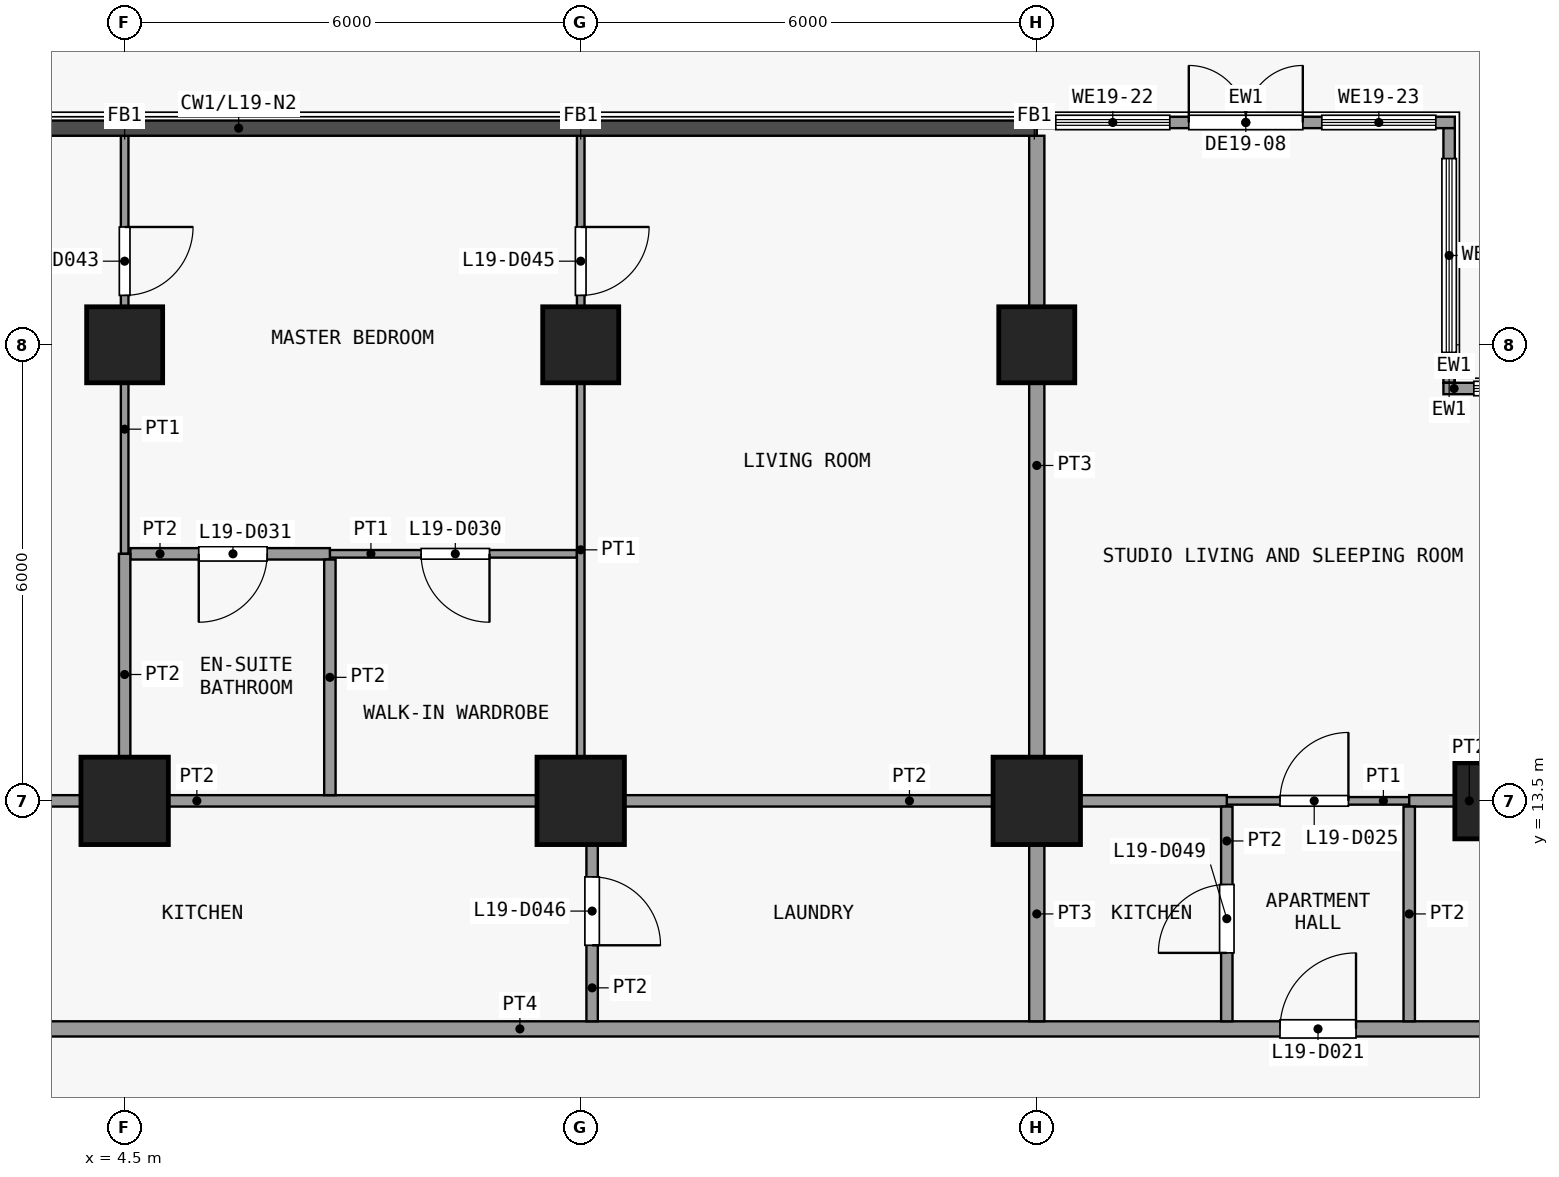
"""IFC4 building model, lengths in metres.
Left out: names, types, materials, properties, quantities, classifications, styles, units other than length and angle.
Written with IfcOpenShell. Run it as: python <this file> out.ifc"""

import sys

from ifc_helpers import new_model, si_unit, direction, frame, frame_2d, origin, origin_2d, place, context, subcontext, project, spatial, rectangle, extrude, element, fill, save


model = new_model("IFC4")
c1 = context("Model", 3, precision=1e-05, world=origin(), true_north=direction((0.0, 1.0)))
c2 = subcontext(c1, "Body", "Model", "MODEL_VIEW")
j1 = project(units=[si_unit("LENGTHUNIT", "METRE"), si_unit("PLANEANGLEUNIT", "RADIAN")], contexts=[c1])
p1 = place(None, origin())
s1 = spatial("IfcSite", under=j1, at=p1, CompositionType="ELEMENT")
p2 = place(p1, origin())
s2 = spatial("IfcBuilding", under=s1, at=p2, CompositionType="ELEMENT")
p3 = place(p2, frame((0.0, 0.0, 81.1)))
s3 = spatial("IfcBuildingStorey", under=s2, at=p3, CompositionType="ELEMENT", Elevation=81.1)
p4 = place(p3, frame((4.5, 13.5, 0.0), z_axis=(0.0, 0.0, 1.0), x_axis=(1.0, 0.0, 0.0)))
e1 = element("IfcColumn", 1, at=p4, inside=s3, PredefinedType="COLUMN", context=c2, shape_type="SweptSolid", body=[
    extrude(rectangle(XDim=1.15, YDim=1.15, at=origin_2d()), origin(), (0.0, 0.0, 1.0), 3.6),
])
p5 = place(p3, frame((4.5, 19.5, 0.0), z_axis=(0.0, 0.0, 1.0), x_axis=(1.0, 0.0, 0.0)))
e2 = element("IfcColumn", 2, at=p5, inside=s3, PredefinedType="COLUMN", context=c2, shape_type="SweptSolid", body=[
    extrude(rectangle(XDim=1.0, YDim=1.0, at=origin_2d()), origin(), (0.0, 0.0, 1.0), 3.6),
])
p6 = place(p3, frame((10.5, 13.5, 0.0), z_axis=(0.0, 0.0, 1.0), x_axis=(1.0, 0.0, 0.0)))
e3 = element("IfcColumn", 3, at=p6, inside=s3, PredefinedType="COLUMN", context=c2, shape_type="SweptSolid", body=[
    extrude(rectangle(XDim=1.15, YDim=1.15, at=origin_2d()), origin(), (0.0, 0.0, 1.0), 3.6),
])
p7 = place(p3, frame((10.5, 19.5, 0.0), z_axis=(0.0, 0.0, 1.0), x_axis=(1.0, 0.0, 0.0)))
e4 = element("IfcColumn", 4, at=p7, inside=s3, PredefinedType="COLUMN", context=c2, shape_type="SweptSolid", body=[
    extrude(rectangle(XDim=1.0, YDim=1.0, at=origin_2d()), origin(), (0.0, 0.0, 1.0), 3.6),
])
p8 = place(p3, frame((16.5, 13.5, 0.0), z_axis=(0.0, 0.0, 1.0), x_axis=(1.0, 0.0, 0.0)))
e5 = element("IfcColumn", 5, at=p8, inside=s3, PredefinedType="COLUMN", context=c2, shape_type="SweptSolid", body=[
    extrude(rectangle(XDim=1.15, YDim=1.15, at=origin_2d()), origin(), (0.0, 0.0, 1.0), 3.6),
])
for number, where, z_axis, x_axis in (
    (6, (16.5, 19.5, 0.0), (0.0, 0.0, 1.0), (1.0, 0.0, 0.0)),
    (7, (22.5, 13.5, 0.0), (0.0, 0.0, 1.0), (1.0, 0.0, 0.0)),
):
    element("IfcColumn", number, at=place(p3, frame(where, z_axis=z_axis, x_axis=x_axis)), inside=s3, PredefinedType="COLUMN", context=c2, shape_type="SweptSolid", body=[
        extrude(rectangle(XDim=1.0, YDim=1.0, at=origin_2d()), origin(), (0.0, 0.0, 1.0), 3.6),
    ])
p9 = place(p3, frame((21.925, 22.35, 0.0), z_axis=(0.0, 0.0, 1.0), x_axis=(0.0, -1.0, 0.0)))
e8 = element("IfcWall", 8, at=p9, inside=s3, PredefinedType="SOLIDWALL", context=c2, shape_type="SweptSolid", body=[
    extrude(rectangle(XDim=3.35, YDim=0.15, at=frame_2d((1.675, 0.0))), origin(), (0.0, 0.0, 1.0), 3.3),
])
p10 = place(p9, frame((0.4, 0.0, 0.9)))
e9 = element("IfcOpeningElement", 9, at=p10, cuts=e8, PredefinedType="OPENING", context=c2, shape_type="SweptSolid", body=[
    extrude(rectangle(XDim=2.55, YDim=2.4, at=frame_2d((1.275, 1.2))), frame((0.0, 0.085, 0.0), z_axis=(0.0, -1.0, 0.0), x_axis=(1.0, 0.0, 0.0)), (0.0, 0.0, 1.0), 0.17),
])
p11 = place(p3, frame((21.85, 18.925, 0.0), z_axis=(0.0, 0.0, 1.0), x_axis=(1.0, 0.0, 0.0)))
e10 = element("IfcWall", 10, at=p11, inside=s3, PredefinedType="SOLIDWALL", context=c2, shape_type="SweptSolid", body=[
    extrude(rectangle(XDim=3.65, YDim=0.15, at=frame_2d((1.825, 0.0))), origin(), (0.0, 0.0, 1.0), 3.3),
])
p12 = place(p11, frame((0.4, 0.0, 0.9)))
e11 = element("IfcOpeningElement", 11, at=p12, cuts=e10, PredefinedType="OPENING", context=c2, shape_type="SweptSolid", body=[
    extrude(rectangle(XDim=2.85, YDim=2.4, at=frame_2d((1.425, 1.2))), frame((0.0, 0.085, 0.0), z_axis=(0.0, -1.0, 0.0), x_axis=(1.0, 0.0, 0.0)), (0.0, 0.0, 1.0), 0.17),
])
p13 = place(p3, frame((16.5, 22.425, 0.0), z_axis=(0.0, 0.0, 1.0), x_axis=(1.0, 0.0, 0.0)))
e12 = element("IfcWall", 12, at=p13, inside=s3, PredefinedType="SOLIDWALL", context=c2, shape_type="SweptSolid", body=[
    extrude(rectangle(XDim=5.5, YDim=0.15, at=frame_2d((2.75, 0.0))), origin(), (0.0, 0.0, 1.0), 3.3),
])
p14 = place(p13, frame((2.0, 0.0, 0.0)))
e13 = element("IfcOpeningElement", 13, at=p14, cuts=e12, PredefinedType="OPENING", context=c2, shape_type="SweptSolid", body=[
    extrude(rectangle(XDim=1.5, YDim=2.4, at=frame_2d((0.75, 1.2))), frame((0.0, 0.085, 0.0), z_axis=(0.0, -1.0, 0.0), x_axis=(1.0, 0.0, 0.0)), (0.0, 0.0, 1.0), 0.17),
])
p15 = place(p13, frame((0.25, 0.0, 0.9)))
e14 = element("IfcOpeningElement", 14, at=p15, cuts=e12, PredefinedType="OPENING", context=c2, shape_type="SweptSolid", body=[
    extrude(rectangle(XDim=1.5, YDim=2.1, at=frame_2d((0.75, 1.05))), frame((0.0, 0.085, 0.0), z_axis=(0.0, -1.0, 0.0), x_axis=(1.0, 0.0, 0.0)), (0.0, 0.0, 1.0), 0.17),
])
p16 = place(p13, frame((3.75, 0.0, 0.9)))
e15 = element("IfcOpeningElement", 15, at=p16, cuts=e12, PredefinedType="OPENING", context=c2, shape_type="SweptSolid", body=[
    extrude(rectangle(XDim=1.5, YDim=2.1, at=frame_2d((0.75, 1.05))), frame((0.0, 0.085, 0.0), z_axis=(0.0, -1.0, 0.0), x_axis=(1.0, 0.0, 0.0)), (0.0, 0.0, 1.0), 0.17),
])
p17 = place(p3, frame((-23.85, 10.5, 0.0), z_axis=(0.0, 0.0, 1.0), x_axis=(1.0, 0.0, 0.0)))
e16 = element("IfcWall", 16, at=p17, inside=s3, PredefinedType="PARTITIONING", context=c2, shape_type="SweptSolid", body=[
    extrude(rectangle(XDim=49.2, YDim=0.2, at=frame_2d((24.6, 0.0))), origin(), (0.0, 0.0, 1.0), 3.3),
])
p18 = place(p17, frame((5.55, 0.0, 0.0)))
e17 = element("IfcOpeningElement", 17, at=p18, cuts=e16, PredefinedType="OPENING", context=c2, shape_type="SweptSolid", body=[
    extrude(rectangle(XDim=1.0, YDim=2.1, at=frame_2d((0.5, 1.05))), frame((0.0, 0.11, 0.0), z_axis=(0.0, -1.0, 0.0), x_axis=(1.0, 0.0, 0.0)), (0.0, 0.0, 1.0), 0.22),
])
p19 = place(p17, frame((14.05, 0.0, 0.0)))
e18 = element("IfcOpeningElement", 18, at=p19, cuts=e16, PredefinedType="OPENING", context=c2, shape_type="SweptSolid", body=[
    extrude(rectangle(XDim=1.0, YDim=2.1, at=frame_2d((0.5, 1.05))), frame((0.0, 0.11, 0.0), z_axis=(0.0, -1.0, 0.0), x_axis=(1.0, 0.0, 0.0)), (0.0, 0.0, 1.0), 0.22),
])
p20 = place(p17, frame((22.55, 0.0, 0.0)))
e19 = element("IfcOpeningElement", 19, at=p20, cuts=e16, PredefinedType="OPENING", context=c2, shape_type="SweptSolid", body=[
    extrude(rectangle(XDim=1.0, YDim=2.1, at=frame_2d((0.5, 1.05))), frame((0.0, 0.11, 0.0), z_axis=(0.0, -1.0, 0.0), x_axis=(1.0, 0.0, 0.0)), (0.0, 0.0, 1.0), 0.22),
])
p21 = place(p17, frame((43.55, 0.0, 0.0)))
e20 = element("IfcOpeningElement", 20, at=p21, cuts=e16, PredefinedType="OPENING", context=c2, shape_type="SweptSolid", body=[
    extrude(rectangle(XDim=1.0, YDim=2.1, at=frame_2d((0.5, 1.05))), frame((0.0, 0.11, 0.0), z_axis=(0.0, -1.0, 0.0), x_axis=(1.0, 0.0, 0.0)), (0.0, 0.0, 1.0), 0.22),
])
p22 = place(p3, frame((19.0, 13.5, 0.0), z_axis=(0.0, 0.0, 1.0), x_axis=(1.0, 0.0, 0.0)))
e21 = element("IfcWall", 21, at=p22, inside=s3, PredefinedType="PARTITIONING", context=c2, shape_type="SweptSolid", body=[
    extrude(rectangle(XDim=2.4, YDim=0.1, at=frame_2d((1.2, 0.0))), origin(), (0.0, 0.0, 1.0), 3.3),
])
p23 = place(p22, frame((0.7, 0.0, 0.0)))
e22 = element("IfcOpeningElement", 22, at=p23, cuts=e21, PredefinedType="OPENING", context=c2, shape_type="SweptSolid", body=[
    extrude(rectangle(XDim=0.9, YDim=2.1, at=frame_2d((0.45, 1.05))), frame((0.0, 0.06, 0.0), z_axis=(0.0, -1.0, 0.0), x_axis=(1.0, 0.0, 0.0)), (0.0, 0.0, 1.0), 0.12),
])
p24 = place(p3, frame((0.4, 13.5, 0.0), z_axis=(0.0, 0.0, 1.0), x_axis=(1.0, 0.0, 0.0)))
e23 = element("IfcWall", 23, at=p24, inside=s3, PredefinedType="PARTITIONING", context=c2, shape_type="SweptSolid", body=[
    extrude(rectangle(XDim=10.1, YDim=0.15, at=frame_2d((5.05, 0.0))), origin(), (0.0, 0.0, 1.0), 3.3),
])
p25 = place(p3, frame((10.65, 13.5, 0.0), z_axis=(0.0, 0.0, 1.0), x_axis=(1.0, 0.0, 0.0)))
e24 = element("IfcWall", 24, at=p25, inside=s3, PredefinedType="PARTITIONING", context=c2, shape_type="SweptSolid", body=[
    extrude(rectangle(XDim=8.35, YDim=0.15, at=frame_2d((4.175, 0.0))), origin(), (0.0, 0.0, 1.0), 3.3),
])
p26 = place(p3, frame((21.4, 13.5, 0.0), z_axis=(0.0, 0.0, 1.0), x_axis=(1.0, 0.0, 0.0)))
e25 = element("IfcWall", 25, at=p26, inside=s3, PredefinedType="PARTITIONING", context=c2, shape_type="SweptSolid", body=[
    extrude(rectangle(XDim=3.85, YDim=0.15, at=frame_2d((1.925, 0.0))), origin(), (0.0, 0.0, 1.0), 3.3),
])
p27 = place(p26, frame((1.7, 0.0, 0.0)))
e26 = element("IfcOpeningElement", 26, at=p27, cuts=e25, PredefinedType="OPENING", context=c2, shape_type="SweptSolid", body=[
    extrude(rectangle(XDim=0.9, YDim=2.1, at=frame_2d((0.45, 1.05))), frame((0.0, 0.085, 0.0), z_axis=(0.0, -1.0, 0.0), x_axis=(1.0, 0.0, 0.0)), (0.0, 0.0, 1.0), 0.17),
])
p28 = place(p3, frame((7.2, 16.75, 0.0), z_axis=(0.0, 0.0, 1.0), x_axis=(1.0, 0.0, 0.0)))
e27 = element("IfcWall", 27, at=p28, inside=s3, PredefinedType="PARTITIONING", context=c2, shape_type="SweptSolid", body=[
    extrude(rectangle(XDim=3.25, YDim=0.1, at=frame_2d((1.625, 0.0))), origin(), (0.0, 0.0, 1.0), 3.3),
])
p29 = place(p28, frame((1.2, 0.0, 0.0)))
e28 = element("IfcOpeningElement", 28, at=p29, cuts=e27, PredefinedType="OPENING", context=c2, shape_type="SweptSolid", body=[
    extrude(rectangle(XDim=0.9, YDim=2.1, at=frame_2d((0.45, 1.05))), frame((0.0, 0.06, 0.0), z_axis=(0.0, -1.0, 0.0), x_axis=(1.0, 0.0, 0.0)), (0.0, 0.0, 1.0), 0.12),
])
p30 = place(p3, frame((4.575, 16.75, 0.0), z_axis=(0.0, 0.0, 1.0), x_axis=(1.0, 0.0, 0.0)))
e29 = element("IfcWall", 29, at=p30, inside=s3, PredefinedType="PARTITIONING", context=c2, shape_type="SweptSolid", body=[
    extrude(rectangle(XDim=2.625, YDim=0.15, at=frame_2d((1.312, 0.0))), origin(), (0.0, 0.0, 1.0), 3.3),
])
p31 = place(p30, frame((0.9, 0.0, 0.0)))
e30 = element("IfcOpeningElement", 30, at=p31, cuts=e29, PredefinedType="OPENING", context=c2, shape_type="SweptSolid", body=[
    extrude(rectangle(XDim=0.9, YDim=2.1, at=frame_2d((0.45, 1.05))), frame((0.0, 0.085, 0.0), z_axis=(0.0, -1.0, 0.0), x_axis=(1.0, 0.0, 0.0)), (0.0, 0.0, 1.0), 0.17),
])
p32 = place(p3, frame((4.5, 16.75, 0.0), z_axis=(0.0, 0.0, 1.0), x_axis=(0.0, 1.0, 0.0)))
e31 = element("IfcWall", 31, at=p32, inside=s3, PredefinedType="PARTITIONING", context=c2, shape_type="SweptSolid", body=[
    extrude(rectangle(XDim=5.5, YDim=0.1, at=frame_2d((2.75, 0.0))), origin(), (0.0, 0.0, 1.0), 3.3),
])
p33 = place(p32, frame((3.4, 0.0, 0.0)))
e32 = element("IfcOpeningElement", 32, at=p33, cuts=e31, PredefinedType="OPENING", context=c2, shape_type="SweptSolid", body=[
    extrude(rectangle(XDim=0.9, YDim=2.1, at=frame_2d((0.45, 1.05))), frame((0.0, 0.06, 0.0), z_axis=(0.0, -1.0, 0.0), x_axis=(1.0, 0.0, 0.0)), (0.0, 0.0, 1.0), 0.12),
])
p34 = place(p3, frame((4.5, 13.575, 0.0), z_axis=(0.0, 0.0, 1.0), x_axis=(0.0, 1.0, 0.0)))
e33 = element("IfcWall", 33, at=p34, inside=s3, PredefinedType="PARTITIONING", context=c2, shape_type="SweptSolid", body=[
    extrude(rectangle(XDim=3.175, YDim=0.15, at=frame_2d((1.587, 0.0))), origin(), (0.0, 0.0, 1.0), 3.3),
])
p35 = place(p3, frame((7.2, 13.575, 0.0), z_axis=(0.0, 0.0, 1.0), x_axis=(0.0, 1.0, 0.0)))
e34 = element("IfcWall", 34, at=p35, inside=s3, PredefinedType="PARTITIONING", context=c2, shape_type="SweptSolid", body=[
    extrude(rectangle(XDim=3.1, YDim=0.15, at=frame_2d((1.55, 0.0))), origin(), (0.0, 0.0, 1.0), 3.3),
])
p36 = place(p3, frame((10.5, 13.575, 0.0), z_axis=(0.0, 0.0, 1.0), x_axis=(0.0, 1.0, 0.0)))
e35 = element("IfcWall", 35, at=p36, inside=s3, PredefinedType="PARTITIONING", context=c2, shape_type="SweptSolid", body=[
    extrude(rectangle(XDim=8.675, YDim=0.1, at=frame_2d((4.337, 0.0))), origin(), (0.0, 0.0, 1.0), 3.3),
])
p37 = place(p36, frame((6.575, 0.0, 0.0)))
e36 = element("IfcOpeningElement", 36, at=p37, cuts=e35, PredefinedType="OPENING", context=c2, shape_type="SweptSolid", body=[
    extrude(rectangle(XDim=0.9, YDim=2.1, at=frame_2d((0.45, 1.05))), frame((0.0, 0.06, 0.0), z_axis=(0.0, -1.0, 0.0), x_axis=(1.0, 0.0, 0.0)), (0.0, 0.0, 1.0), 0.12),
])
p38 = place(p3, frame((10.65, 10.6, 0.0), z_axis=(0.0, 0.0, 1.0), x_axis=(0.0, 1.0, 0.0)))
e37 = element("IfcWall", 37, at=p38, inside=s3, PredefinedType="PARTITIONING", context=c2, shape_type="SweptSolid", body=[
    extrude(rectangle(XDim=2.825, YDim=0.15, at=frame_2d((1.413, 0.0))), origin(), (0.0, 0.0, 1.0), 3.3),
])
p39 = place(p38, frame((1.0, 0.0, 0.0)))
e38 = element("IfcOpeningElement", 38, at=p39, cuts=e37, PredefinedType="OPENING", context=c2, shape_type="SweptSolid", body=[
    extrude(rectangle(XDim=0.9, YDim=2.1, at=frame_2d((0.45, 1.05))), frame((0.0, 0.085, 0.0), z_axis=(0.0, -1.0, 0.0), x_axis=(1.0, 0.0, 0.0)), (0.0, 0.0, 1.0), 0.17),
])
p40 = place(p3, frame((16.5, 10.6, 0.0), z_axis=(0.0, 0.0, 1.0), x_axis=(0.0, 1.0, 0.0)))
e39 = element("IfcWall", 39, at=p40, inside=s3, PredefinedType="PARTITIONING", context=c2, shape_type="SweptSolid", body=[
    extrude(rectangle(XDim=2.825, YDim=0.2, at=frame_2d((1.413, 0.0))), origin(), (0.0, 0.0, 1.0), 3.3),
])
p41 = place(p3, frame((16.5, 13.575, 0.0), z_axis=(0.0, 0.0, 1.0), x_axis=(0.0, 1.0, 0.0)))
e40 = element("IfcWall", 40, at=p41, inside=s3, PredefinedType="PARTITIONING", context=c2, shape_type="SweptSolid", body=[
    extrude(rectangle(XDim=8.675, YDim=0.2, at=frame_2d((4.337, 0.0))), origin(), (0.0, 0.0, 1.0), 3.3),
])
p42 = place(p3, frame((19.0, 10.6, 0.0), z_axis=(0.0, 0.0, 1.0), x_axis=(0.0, 1.0, 0.0)))
e41 = element("IfcWall", 41, at=p42, inside=s3, PredefinedType="PARTITIONING", context=c2, shape_type="SweptSolid", body=[
    extrude(rectangle(XDim=2.825, YDim=0.15, at=frame_2d((1.413, 0.0))), origin(), (0.0, 0.0, 1.0), 3.3),
])
p43 = place(p42, frame((0.9, 0.0, 0.0)))
e42 = element("IfcOpeningElement", 42, at=p43, cuts=e41, PredefinedType="OPENING", context=c2, shape_type="SweptSolid", body=[
    extrude(rectangle(XDim=0.9, YDim=2.1, at=frame_2d((0.45, 1.05))), frame((0.0, 0.085, 0.0), z_axis=(0.0, -1.0, 0.0), x_axis=(1.0, 0.0, 0.0)), (0.0, 0.0, 1.0), 0.17),
])
p44 = place(p3, frame((21.4, 10.6, 0.0), z_axis=(0.0, 0.0, 1.0), x_axis=(0.0, 1.0, 0.0)))
e43 = element("IfcWall", 43, at=p44, inside=s3, PredefinedType="PARTITIONING", context=c2, shape_type="SweptSolid", body=[
    extrude(rectangle(XDim=2.825, YDim=0.15, at=frame_2d((1.413, 0.0))), origin(), (0.0, 0.0, 1.0), 3.3),
])
p45 = place(p10, origin())
e44 = element("IfcWindow", 44, at=p45, inside=s3, PartitioningType="SINGLE_PANEL", PredefinedType="WINDOW", context=c2, shape_type="SweptSolid", body=[
    extrude(rectangle(XDim=2.55, YDim=2.4, at=frame_2d((1.275, 1.2))), frame((0.0, 0.03, 0.0), z_axis=(0.0, -1.0, 0.0), x_axis=(1.0, 0.0, 0.0)), (0.0, 0.0, 1.0), 0.06),
])
fill(e9, e44)
p46 = place(p12, origin())
e45 = element("IfcWindow", 45, at=p46, inside=s3, PartitioningType="SINGLE_PANEL", PredefinedType="WINDOW", context=c2, shape_type="SweptSolid", body=[
    extrude(rectangle(XDim=2.85, YDim=2.4, at=frame_2d((1.425, 1.2))), frame((0.0, 0.03, 0.0), z_axis=(0.0, -1.0, 0.0), x_axis=(1.0, 0.0, 0.0)), (0.0, 0.0, 1.0), 0.06),
])
fill(e11, e45)
p47 = place(p14, origin())
e46 = element("IfcDoor", 46, at=p47, inside=s3, OperationType="DOUBLE_DOOR_SINGLE_SWING", PredefinedType="DOOR", context=c2, shape_type="SweptSolid", body=[
    extrude(rectangle(XDim=1.5, YDim=2.4, at=frame_2d((0.75, 1.2))), frame((0.0, 0.025, 0.0), z_axis=(0.0, -1.0, 0.0), x_axis=(1.0, 0.0, 0.0)), (0.0, 0.0, 1.0), 0.05),
])
fill(e13, e46)
p48 = place(p15, origin())
e47 = element("IfcWindow", 47, at=p48, inside=s3, PartitioningType="SINGLE_PANEL", PredefinedType="WINDOW", context=c2, shape_type="SweptSolid", body=[
    extrude(rectangle(XDim=1.5, YDim=2.1, at=frame_2d((0.75, 1.05))), frame((0.0, 0.03, 0.0), z_axis=(0.0, -1.0, 0.0), x_axis=(1.0, 0.0, 0.0)), (0.0, 0.0, 1.0), 0.06),
])
fill(e14, e47)
p49 = place(p16, origin())
e48 = element("IfcWindow", 48, at=p49, inside=s3, PartitioningType="SINGLE_PANEL", PredefinedType="WINDOW", context=c2, shape_type="SweptSolid", body=[
    extrude(rectangle(XDim=1.5, YDim=2.1, at=frame_2d((0.75, 1.05))), frame((0.0, 0.03, 0.0), z_axis=(0.0, -1.0, 0.0), x_axis=(1.0, 0.0, 0.0)), (0.0, 0.0, 1.0), 0.06),
])
fill(e15, e48)
p50 = place(p21, origin())
e49 = element("IfcDoor", 49, at=p50, inside=s3, OperationType="SINGLE_SWING_LEFT", PredefinedType="DOOR", context=c2, shape_type="SweptSolid", body=[
    extrude(rectangle(XDim=1.0, YDim=2.1, at=frame_2d((0.5, 1.05))), frame((0.0, 0.025, 0.0), z_axis=(0.0, -1.0, 0.0), x_axis=(1.0, 0.0, 0.0)), (0.0, 0.0, 1.0), 0.05),
])
fill(e20, e49)
p51 = place(p23, origin())
e50 = element("IfcDoor", 50, at=p51, inside=s3, OperationType="SINGLE_SWING_LEFT", PredefinedType="DOOR", context=c2, shape_type="SweptSolid", body=[
    extrude(rectangle(XDim=0.9, YDim=2.1, at=frame_2d((0.45, 1.05))), frame((0.0, 0.025, 0.0), z_axis=(0.0, -1.0, 0.0), x_axis=(1.0, 0.0, 0.0)), (0.0, 0.0, 1.0), 0.05),
])
fill(e22, e50)
p52 = place(p29, origin())
e51 = element("IfcDoor", 51, at=p52, inside=s3, OperationType="SINGLE_SWING_RIGHT", PredefinedType="DOOR", context=c2, shape_type="SweptSolid", body=[
    extrude(rectangle(XDim=0.9, YDim=2.1, at=frame_2d((0.45, 1.05))), frame((0.0, 0.025, 0.0), z_axis=(0.0, -1.0, 0.0), x_axis=(1.0, 0.0, 0.0)), (0.0, 0.0, 1.0), 0.05),
])
fill(e28, e51)
p53 = place(p31, origin())
e52 = element("IfcDoor", 52, at=p53, inside=s3, OperationType="SINGLE_SWING_LEFT", PredefinedType="DOOR", context=c2, shape_type="SweptSolid", body=[
    extrude(rectangle(XDim=0.9, YDim=2.1, at=frame_2d((0.45, 1.05))), frame((0.0, 0.025, 0.0), z_axis=(0.0, -1.0, 0.0), x_axis=(1.0, 0.0, 0.0)), (0.0, 0.0, 1.0), 0.05),
])
fill(e30, e52)
p54 = place(p33, origin())
e53 = element("IfcDoor", 53, at=p54, inside=s3, OperationType="SINGLE_SWING_RIGHT", PredefinedType="DOOR", context=c2, shape_type="SweptSolid", body=[
    extrude(rectangle(XDim=0.9, YDim=2.1, at=frame_2d((0.45, 1.05))), frame((0.0, 0.025, 0.0), z_axis=(0.0, -1.0, 0.0), x_axis=(1.0, 0.0, 0.0)), (0.0, 0.0, 1.0), 0.05),
])
fill(e32, e53)
p55 = place(p37, origin())
e54 = element("IfcDoor", 54, at=p55, inside=s3, OperationType="SINGLE_SWING_RIGHT", PredefinedType="DOOR", context=c2, shape_type="SweptSolid", body=[
    extrude(rectangle(XDim=0.9, YDim=2.1, at=frame_2d((0.45, 1.05))), frame((0.0, 0.025, 0.0), z_axis=(0.0, -1.0, 0.0), x_axis=(1.0, 0.0, 0.0)), (0.0, 0.0, 1.0), 0.05),
])
fill(e36, e54)
p56 = place(p39, origin())
e55 = element("IfcDoor", 55, at=p56, inside=s3, OperationType="SINGLE_SWING_LEFT", PredefinedType="DOOR", context=c2, shape_type="SweptSolid", body=[
    extrude(rectangle(XDim=0.9, YDim=2.1, at=frame_2d((0.45, 1.05))), frame((0.0, 0.025, 0.0), z_axis=(0.0, -1.0, 0.0), x_axis=(1.0, 0.0, 0.0)), (0.0, 0.0, 1.0), 0.05),
])
fill(e38, e55)
p57 = place(p43, origin())
e56 = element("IfcDoor", 56, at=p57, inside=s3, OperationType="SINGLE_SWING_RIGHT", PredefinedType="DOOR", context=c2, shape_type="SweptSolid", body=[
    extrude(rectangle(XDim=0.9, YDim=2.1, at=frame_2d((0.45, 1.05))), frame((0.0, 0.025, 0.0), z_axis=(0.0, -1.0, 0.0), x_axis=(1.0, 0.0, 0.0)), (0.0, 0.0, 1.0), 0.05),
])
fill(e42, e56)
save(model, sys.argv[1])
